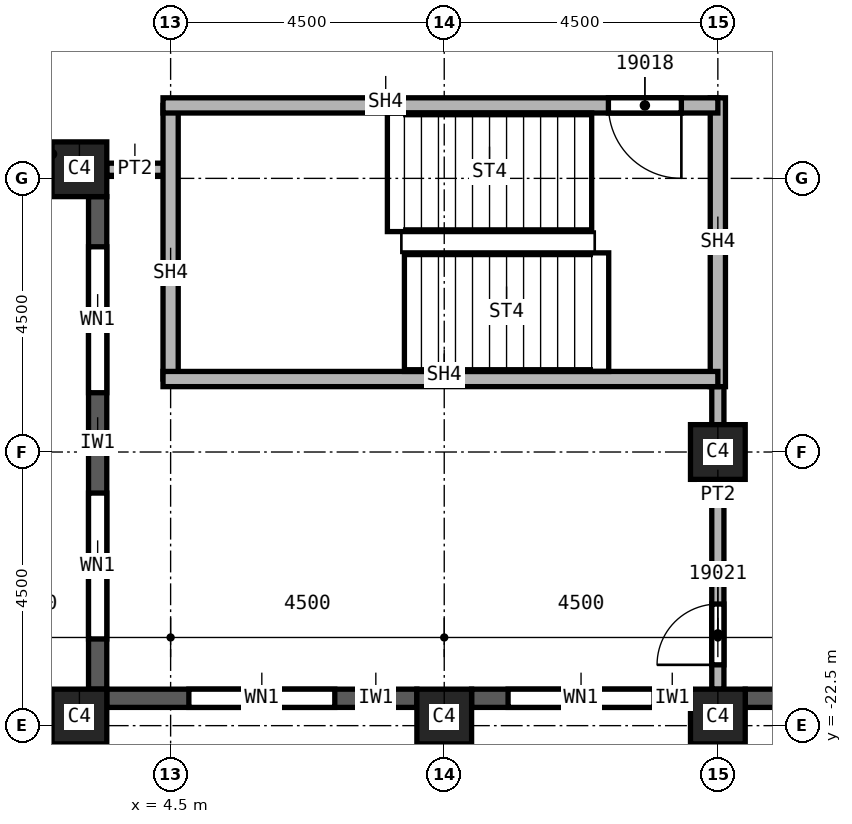
"""IFC4 building model, lengths in metres.
Left out: names, types, materials, properties, quantities, classifications, styles, units other than length and angle.
Written with IfcOpenShell. Run it as: python <this file> out.ifc"""

import sys

from ifc_helpers import new_model, si_unit, direction, frame, frame_2d, origin, origin_2d, place, context, subcontext, project, spatial, rectangle, extrude, element, fill, save


model = new_model("IFC4")
c1 = context("Model", 3, precision=1e-05, world=origin(), true_north=direction((0.0, 1.0)))
c2 = subcontext(c1, "Body", "Model", "MODEL_VIEW")
j1 = project(units=[si_unit("LENGTHUNIT", "METRE"), si_unit("PLANEANGLEUNIT", "RADIAN")], contexts=[c1])
p1 = place(None, origin())
s1 = spatial("IfcSite", under=j1, at=p1, CompositionType="ELEMENT")
p2 = place(p1, origin())
s2 = spatial("IfcBuilding", under=s1, at=p2, CompositionType="ELEMENT")
p3 = place(p2, frame((0.0, 0.0, 282.0)))
s3 = spatial("IfcBuildingStorey", under=s2, at=p3, CompositionType="ELEMENT", Elevation=282.0)
for number, where, z_axis, x_axis in (
    (1, (13.5, -18.0, 0.0), (0.0, 0.0, 1.0), (1.0, 0.0, 0.0)),
    (2, (3.0, -22.35, 0.0), (0.0, 0.0, 1.0), (1.0, 0.0, 0.0)),
    (3, (9.0, -22.35, 0.0), (0.0, 0.0, 1.0), (1.0, 0.0, 0.0)),
    (4, (13.5, -22.35, 0.0), (0.0, 0.0, 1.0), (1.0, 0.0, 0.0)),
    (5, (3.0, -13.35, 0.0), (0.0, 0.0, 1.0), (1.0, 0.0, 0.0)),
):
    element("IfcColumn", number, at=place(p3, frame(where, z_axis=z_axis, x_axis=x_axis)), inside=s3, PredefinedType="COLUMN", context=c2, shape_type="SweptSolid", body=[
        extrude(rectangle(XDim=0.9, YDim=0.9, at=origin_2d()), origin(), (0.0, 0.0, 1.0), 3.72),
    ])
p4 = place(p3, frame((3.3, -13.8, 0.0), z_axis=(0.0, 0.0, 1.0), x_axis=(0.0, -1.0, 0.0)))
e6 = element("IfcWall", 6, at=p4, inside=s3, PredefinedType="SOLIDWALL", context=c2, shape_type="SweptSolid", body=[
    extrude(rectangle(XDim=8.1, YDim=0.3, at=frame_2d((4.05, 0.0))), origin(), (0.0, 0.0, 1.0), 3.12),
])
p5 = place(p4, frame((0.825, 0.0, 0.8)))
e7 = element("IfcOpeningElement", 7, at=p5, cuts=e6, PredefinedType="OPENING", context=c2, shape_type="SweptSolid", body=[
    extrude(rectangle(XDim=2.4, YDim=1.95, at=frame_2d((1.2, 0.975))), frame((0.0, 0.15, 0.0), z_axis=(0.0, -1.0, 0.0), x_axis=(1.0, 0.0, 0.0)), (0.0, 0.0, 1.0), 0.3),
])
p6 = place(p4, frame((4.875, 0.0, 0.8)))
e8 = element("IfcOpeningElement", 8, at=p6, cuts=e6, PredefinedType="OPENING", context=c2, shape_type="SweptSolid", body=[
    extrude(rectangle(XDim=2.4, YDim=1.95, at=frame_2d((1.2, 0.975))), frame((0.0, 0.15, 0.0), z_axis=(0.0, -1.0, 0.0), x_axis=(1.0, 0.0, 0.0)), (0.0, 0.0, 1.0), 0.3),
])
p7 = place(p3, frame((3.45, -22.05, 0.0), z_axis=(0.0, 0.0, 1.0), x_axis=(1.0, 0.0, 0.0)))
e9 = element("IfcWall", 9, at=p7, inside=s3, PredefinedType="SOLIDWALL", context=c2, shape_type="SweptSolid", body=[
    extrude(rectangle(XDim=5.1, YDim=0.3, at=frame_2d((2.55, 0.0))), origin(), (0.0, 0.0, 1.0), 3.12),
])
p8 = place(p7, frame((1.35, 0.0, 0.8)))
e10 = element("IfcOpeningElement", 10, at=p8, cuts=e9, PredefinedType="OPENING", context=c2, shape_type="SweptSolid", body=[
    extrude(rectangle(XDim=2.4, YDim=1.95, at=frame_2d((1.2, 0.975))), frame((0.0, 0.15, 0.0), z_axis=(0.0, -1.0, 0.0), x_axis=(1.0, 0.0, 0.0)), (0.0, 0.0, 1.0), 0.3),
])
p9 = place(p3, frame((9.45, -22.05, 0.0), z_axis=(0.0, 0.0, 1.0), x_axis=(1.0, 0.0, 0.0)))
e11 = element("IfcWall", 11, at=p9, inside=s3, PredefinedType="SOLIDWALL", context=c2, shape_type="SweptSolid", body=[
    extrude(rectangle(XDim=3.6, YDim=0.3, at=frame_2d((1.8, 0.0))), origin(), (0.0, 0.0, 1.0), 3.12),
])
p10 = place(p9, frame((0.6, 0.0, 0.8)))
e12 = element("IfcOpeningElement", 12, at=p10, cuts=e11, PredefinedType="OPENING", context=c2, shape_type="SweptSolid", body=[
    extrude(rectangle(XDim=2.4, YDim=1.95, at=frame_2d((1.2, 0.975))), frame((0.0, 0.15, 0.0), z_axis=(0.0, -1.0, 0.0), x_axis=(1.0, 0.0, 0.0)), (0.0, 0.0, 1.0), 0.3),
])
p11 = place(p3, frame((13.95, -22.05, 0.0), z_axis=(0.0, 0.0, 1.0), x_axis=(1.0, 0.0, 0.0)))
e13 = element("IfcWall", 13, at=p11, inside=s3, PredefinedType="SOLIDWALL", context=c2, shape_type="SweptSolid", body=[
    extrude(rectangle(XDim=3.6, YDim=0.3, at=frame_2d((1.8, 0.0))), origin(), (0.0, 0.0, 1.0), 3.12),
])
p12 = place(p11, frame((0.625, 0.0, 0.8)))
e14 = element("IfcOpeningElement", 14, at=p12, cuts=e13, PredefinedType="OPENING", context=c2, shape_type="SweptSolid", body=[
    extrude(rectangle(XDim=0.6, YDim=1.95, at=frame_2d((0.3, 0.975))), frame((0.0, 0.15, 0.0), z_axis=(0.0, -1.0, 0.0), x_axis=(1.0, 0.0, 0.0)), (0.0, 0.0, 1.0), 0.3),
])
p13 = place(p11, frame((1.825, 0.0, 0.8)))
e15 = element("IfcOpeningElement", 15, at=p13, cuts=e13, PredefinedType="OPENING", context=c2, shape_type="SweptSolid", body=[
    extrude(rectangle(XDim=1.0, YDim=1.95, at=frame_2d((0.5, 0.975))), frame((0.0, 0.15, 0.0), z_axis=(0.0, -1.0, 0.0), x_axis=(1.0, 0.0, 0.0)), (0.0, 0.0, 1.0), 0.3),
])
p14 = place(p3, frame((4.5, -13.35, 0.0), z_axis=(0.0, 0.0, 1.0), x_axis=(-1.0, 0.0, 0.0)))
e16 = element("IfcWall", 16, at=p14, inside=s3, PredefinedType="PARTITIONING", context=c2, shape_type="SweptSolid", body=[
    extrude(rectangle(XDim=1.05, YDim=0.2, at=frame_2d((0.525, 0.0))), origin(), (0.0, 0.0, 1.0), 3.72),
])
p15 = place(p3, frame((13.5, -21.9, 0.0), z_axis=(0.0, 0.0, 1.0), x_axis=(0.0, 1.0, 0.0)))
e17 = element("IfcWall", 17, at=p15, inside=s3, PredefinedType="PARTITIONING", context=c2, shape_type="SweptSolid", body=[
    extrude(rectangle(XDim=5.225, YDim=0.2, at=frame_2d((2.612, 0.0))), origin(), (0.0, 0.0, 1.0), 3.72),
])
p16 = place(p15, frame((0.4, 0.0, 0.0)))
e18 = element("IfcOpeningElement", 18, at=p16, cuts=e17, PredefinedType="OPENING", context=c2, shape_type="SweptSolid", body=[
    extrude(rectangle(XDim=1.0, YDim=2.1, at=frame_2d((0.5, 1.05))), frame((0.0, 0.1, 0.0), z_axis=(0.0, -1.0, 0.0), x_axis=(1.0, 0.0, 0.0)), (0.0, 0.0, 1.0), 0.2),
])
p17 = place(p3, frame((4.5, -16.8, 0.0), z_axis=(0.0, 0.0, 1.0), x_axis=(0.0, 1.0, 0.0)))
e19 = element("IfcWall", 19, at=p17, inside=s3, PredefinedType="SOLIDWALL", context=c2, shape_type="SweptSolid", body=[
    extrude(rectangle(XDim=4.5, YDim=0.25, at=frame_2d((2.25, 0.0))), origin(), (0.0, 0.0, 1.0), 3.72),
])
p18 = place(p3, frame((13.5, -16.925, 0.0), z_axis=(0.0, 0.0, 1.0), x_axis=(0.0, 1.0, 0.0)))
e20 = element("IfcWall", 20, at=p18, inside=s3, PredefinedType="SOLIDWALL", context=c2, shape_type="SweptSolid", body=[
    extrude(rectangle(XDim=4.75, YDim=0.25, at=frame_2d((2.375, 0.0))), origin(), (0.0, 0.0, 1.0), 3.72),
])
p19 = place(p3, frame((13.5, -16.8, 0.0), z_axis=(0.0, 0.0, 1.0), x_axis=(-1.0, 0.0, 0.0)))
e21 = element("IfcWall", 21, at=p19, inside=s3, PredefinedType="SOLIDWALL", context=c2, shape_type="SweptSolid", body=[
    extrude(rectangle(XDim=9.125, YDim=0.25, at=frame_2d((4.562, 0.0))), origin(), (0.0, 0.0, 1.0), 3.72),
])
p20 = place(p3, frame((13.5, -12.3, 0.0), z_axis=(0.0, 0.0, 1.0), x_axis=(-1.0, 0.0, 0.0)))
e22 = element("IfcWall", 22, at=p20, inside=s3, PredefinedType="SOLIDWALL", context=c2, shape_type="SweptSolid", body=[
    extrude(rectangle(XDim=9.125, YDim=0.25, at=frame_2d((4.562, 0.0))), origin(), (0.0, 0.0, 1.0), 3.72),
])
p21 = place(p20, frame((0.6, 0.0, 0.0)))
e23 = element("IfcOpeningElement", 23, at=p21, cuts=e22, PredefinedType="OPENING", context=c2, shape_type="SweptSolid", body=[
    extrude(rectangle(XDim=1.2, YDim=2.1, at=frame_2d((0.6, 1.05))), frame((0.0, 0.125, 0.0), z_axis=(0.0, -1.0, 0.0), x_axis=(1.0, 0.0, 0.0)), (0.0, 0.0, 1.0), 0.25),
])
p22 = place(p5, origin())
e24 = element("IfcWindow", 24, at=p22, inside=s3, PartitioningType="SINGLE_PANEL", PredefinedType="WINDOW", context=c2, shape_type="SweptSolid", body=[
    extrude(rectangle(XDim=2.4, YDim=1.95, at=frame_2d((1.2, 0.975))), frame((0.0, 0.03, 0.0), z_axis=(0.0, -1.0, 0.0), x_axis=(1.0, 0.0, 0.0)), (0.0, 0.0, 1.0), 0.06),
])
fill(e7, e24)
p23 = place(p6, origin())
e25 = element("IfcWindow", 25, at=p23, inside=s3, PartitioningType="SINGLE_PANEL", PredefinedType="WINDOW", context=c2, shape_type="SweptSolid", body=[
    extrude(rectangle(XDim=2.4, YDim=1.95, at=frame_2d((1.2, 0.975))), frame((0.0, 0.03, 0.0), z_axis=(0.0, -1.0, 0.0), x_axis=(1.0, 0.0, 0.0)), (0.0, 0.0, 1.0), 0.06),
])
fill(e8, e25)
p24 = place(p8, origin())
e26 = element("IfcWindow", 26, at=p24, inside=s3, PartitioningType="SINGLE_PANEL", PredefinedType="WINDOW", context=c2, shape_type="SweptSolid", body=[
    extrude(rectangle(XDim=2.4, YDim=1.95, at=frame_2d((1.2, 0.975))), frame((0.0, 0.03, 0.0), z_axis=(0.0, -1.0, 0.0), x_axis=(1.0, 0.0, 0.0)), (0.0, 0.0, 1.0), 0.06),
])
fill(e10, e26)
p25 = place(p10, origin())
e27 = element("IfcWindow", 27, at=p25, inside=s3, PartitioningType="SINGLE_PANEL", PredefinedType="WINDOW", context=c2, shape_type="SweptSolid", body=[
    extrude(rectangle(XDim=2.4, YDim=1.95, at=frame_2d((1.2, 0.975))), frame((0.0, 0.03, 0.0), z_axis=(0.0, -1.0, 0.0), x_axis=(1.0, 0.0, 0.0)), (0.0, 0.0, 1.0), 0.06),
])
fill(e12, e27)
p26 = place(p21, origin())
e28 = element("IfcDoor", 28, at=p26, inside=s3, OperationType="SINGLE_SWING_LEFT", PredefinedType="DOOR", context=c2, shape_type="SweptSolid", body=[
    extrude(rectangle(XDim=1.2, YDim=2.1, at=frame_2d((0.6, 1.05))), frame((0.0, 0.025, 0.0), z_axis=(0.0, -1.0, 0.0), x_axis=(1.0, 0.0, 0.0)), (0.0, 0.0, 1.0), 0.05),
])
fill(e23, e28)
p27 = place(p16, origin())
e29 = element("IfcDoor", 29, at=p27, inside=s3, OperationType="SINGLE_SWING_RIGHT", PredefinedType="DOOR", context=c2, shape_type="SweptSolid", body=[
    extrude(rectangle(XDim=1.0, YDim=2.1, at=frame_2d((0.5, 1.05))), frame((0.0, 0.025, 0.0), z_axis=(0.0, -1.0, 0.0), x_axis=(1.0, 0.0, 0.0)), (0.0, 0.0, 1.0), 0.05),
])
fill(e18, e29)
save(model, sys.argv[1])
